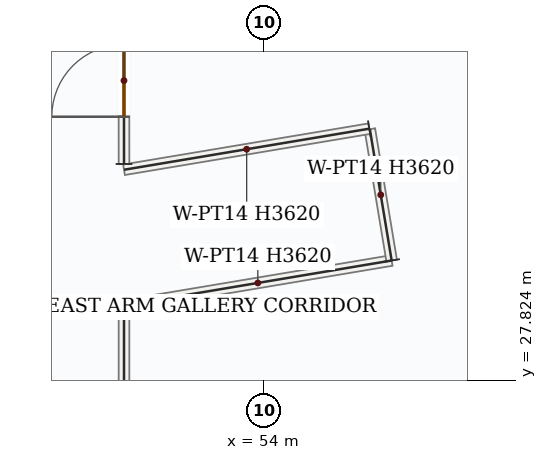
"""IFC4 building model, lengths in metres.
Left out: names, types, materials, properties, quantities, classifications, styles, units other than length and angle.
Written with IfcOpenShell. Run it as: python <this file> out.ifc"""

import sys

from ifc_helpers import new_model, si_unit, direction, frame, frame_2d, origin, place, context, subcontext, project, spatial, rectangle, extrude, source, transform, mapped, element, fill, save


model = new_model("IFC4")
c1 = context("Model", 3, precision=1e-05, world=origin(), true_north=direction((0.0, 1.0)))
c2 = subcontext(c1, "Body", "Model", "MODEL_VIEW")
j1 = project(units=[si_unit("LENGTHUNIT", "METRE"), si_unit("PLANEANGLEUNIT", "RADIAN")], contexts=[c1])
p1 = place(None, origin())
s1 = spatial("IfcSite", under=j1, at=p1, CompositionType="ELEMENT")
p2 = place(p1, origin())
s2 = spatial("IfcBuilding", under=s1, at=p2, CompositionType="ELEMENT")
p3 = place(p2, frame((0.0, 0.0, 135.6)))
s3 = spatial("IfcBuildingStorey", under=s2, at=p3, CompositionType="ELEMENT", Elevation=135.6)
m1 = source(origin(), c2, "Body", "SweptSolid", [
    extrude(rectangle(XDim=8.203, YDim=0.14, at=frame_2d((4.101, 0.0))), origin(), (0.0, 0.0, 1.0), 2.693),
])
p4 = place(p3, frame((52.15, 20.608, 0.0), z_axis=(0.0, 0.0, 1.0), x_axis=(2.9763676e-05, 0.999999999557, 0.0)))
e1 = element("IfcWall", 1, at=p4, inside=s3, PredefinedType="PARTITIONING", context=c2, shape_type="MappedRepresentation", body=[
    mapped(m1, transform((0.0, 0.0, 0.0), x_axis=(1.0, 0.0, 0.0), y_axis=(0.0, 1.0, 0.0), z_axis=(0.0, 0.0, 1.0), scale=1.0)),
])
m2 = source(origin(), c2, "Body", "SweptSolid", [
    extrude(rectangle(XDim=3.57, YDim=0.14, at=frame_2d((1.785, 0.0))), origin(), (0.0, 0.0, 1.0), 3.62),
])
p5 = place(p3, frame((52.15, 28.81, 0.0), z_axis=(0.0, 0.0, 1.0), x_axis=(0.98622523321, 0.165407948356, 0.0)))
e2 = element("IfcWall", 2, at=p5, inside=s3, PredefinedType="PARTITIONING", context=c2, shape_type="MappedRepresentation", body=[
    mapped(m2, transform((0.0, 0.0, 0.0), x_axis=(1.0, 0.0, 0.0), y_axis=(0.0, 1.0, 0.0), z_axis=(0.0, 0.0, 1.0), scale=1.0)),
])
m3 = source(origin(), c2, "Body", "SweptSolid", [
    extrude(rectangle(XDim=1.751, YDim=0.14, at=frame_2d((0.875, 0.0))), origin(), (0.0, 0.0, 1.0), 3.62),
])
p6 = place(p3, frame((55.671, 29.401, 0.0), z_axis=(0.0, 0.0, 1.0), x_axis=(-0.163946827652, 0.986469177269, 0.0)))
e3 = element("IfcWall", 3, at=p6, inside=s3, PredefinedType="PARTITIONING", context=c2, shape_type="MappedRepresentation", body=[
    mapped(m3, transform((0.0, 0.0, 0.0), x_axis=(1.0, 0.0, 0.0), y_axis=(0.0, 1.0, 0.0), z_axis=(0.0, 0.0, 1.0), scale=1.0)),
])
m4 = source(origin(), c2, "Body", "SweptSolid", [
    extrude(rectangle(XDim=3.272, YDim=0.14, at=frame_2d((1.636, 0.0))), origin(), (0.0, 0.0, 1.0), 3.62),
])
p7 = place(p3, frame((55.377, 31.135, 0.0), z_axis=(0.0, 0.0, 1.0), x_axis=(-0.986274692216, -0.165112784165, 0.0)))
e4 = element("IfcWall", 4, at=p7, inside=s3, PredefinedType="PARTITIONING", context=c2, shape_type="MappedRepresentation", body=[
    mapped(m4, transform((0.0, 0.0, 0.0), x_axis=(1.0, 0.0, 0.0), y_axis=(0.0, 1.0, 0.0), z_axis=(0.0, 0.0, 1.0), scale=1.0)),
])
p8 = place(p3, frame((52.15, 30.671, 0.0), z_axis=(0.0, 0.0, 1.0), x_axis=(-0.000447667607, 0.999999899797, 0.0)))
e5 = element("IfcWall", 5, at=p8, inside=s3, PredefinedType="PARTITIONING", context=c2, shape_type="SweptSolid", body=[
    extrude(rectangle(XDim=2.727, YDim=0.14, at=frame_2d((1.363, 0.0))), origin(), (0.0, 0.0, 1.0), 3.079),
])
p9 = place(p8, frame((0.622, 0.0, 0.0)))
e6 = element("IfcOpeningElement", 6, at=p9, cuts=e5, PredefinedType="OPENING", context=c2, shape_type="SweptSolid", body=[
    extrude(rectangle(XDim=0.95, YDim=2.15, at=frame_2d((0.475, 1.075))), frame((0.0, 0.08, 0.0), z_axis=(0.0, -1.0, 0.0), x_axis=(1.0, 0.0, 0.0)), (0.0, 0.0, 1.0), 0.16),
])
m5 = source(origin(), c2, "Body", "SweptSolid", [
    extrude(rectangle(XDim=0.95, YDim=2.15, at=frame_2d((0.475, 1.075))), frame((0.0, 0.025, 0.0), z_axis=(0.0, -1.0, 0.0), x_axis=(1.0, 0.0, 0.0)), (0.0, 0.0, 1.0), 0.05),
])
p10 = place(p9, origin())
e7 = element("IfcDoor", 7, at=p10, inside=s3, OperationType="SINGLE_SWING_LEFT", PredefinedType="DOOR", context=c2, shape_type="MappedRepresentation", body=[
    mapped(m5, transform((0.0, 0.0, 0.0), x_axis=(1.0, 0.0, 0.0), y_axis=(0.0, 1.0, 0.0), z_axis=(0.0, 0.0, 1.0), scale=1.0)),
])
fill(e6, e7)
save(model, sys.argv[1])
